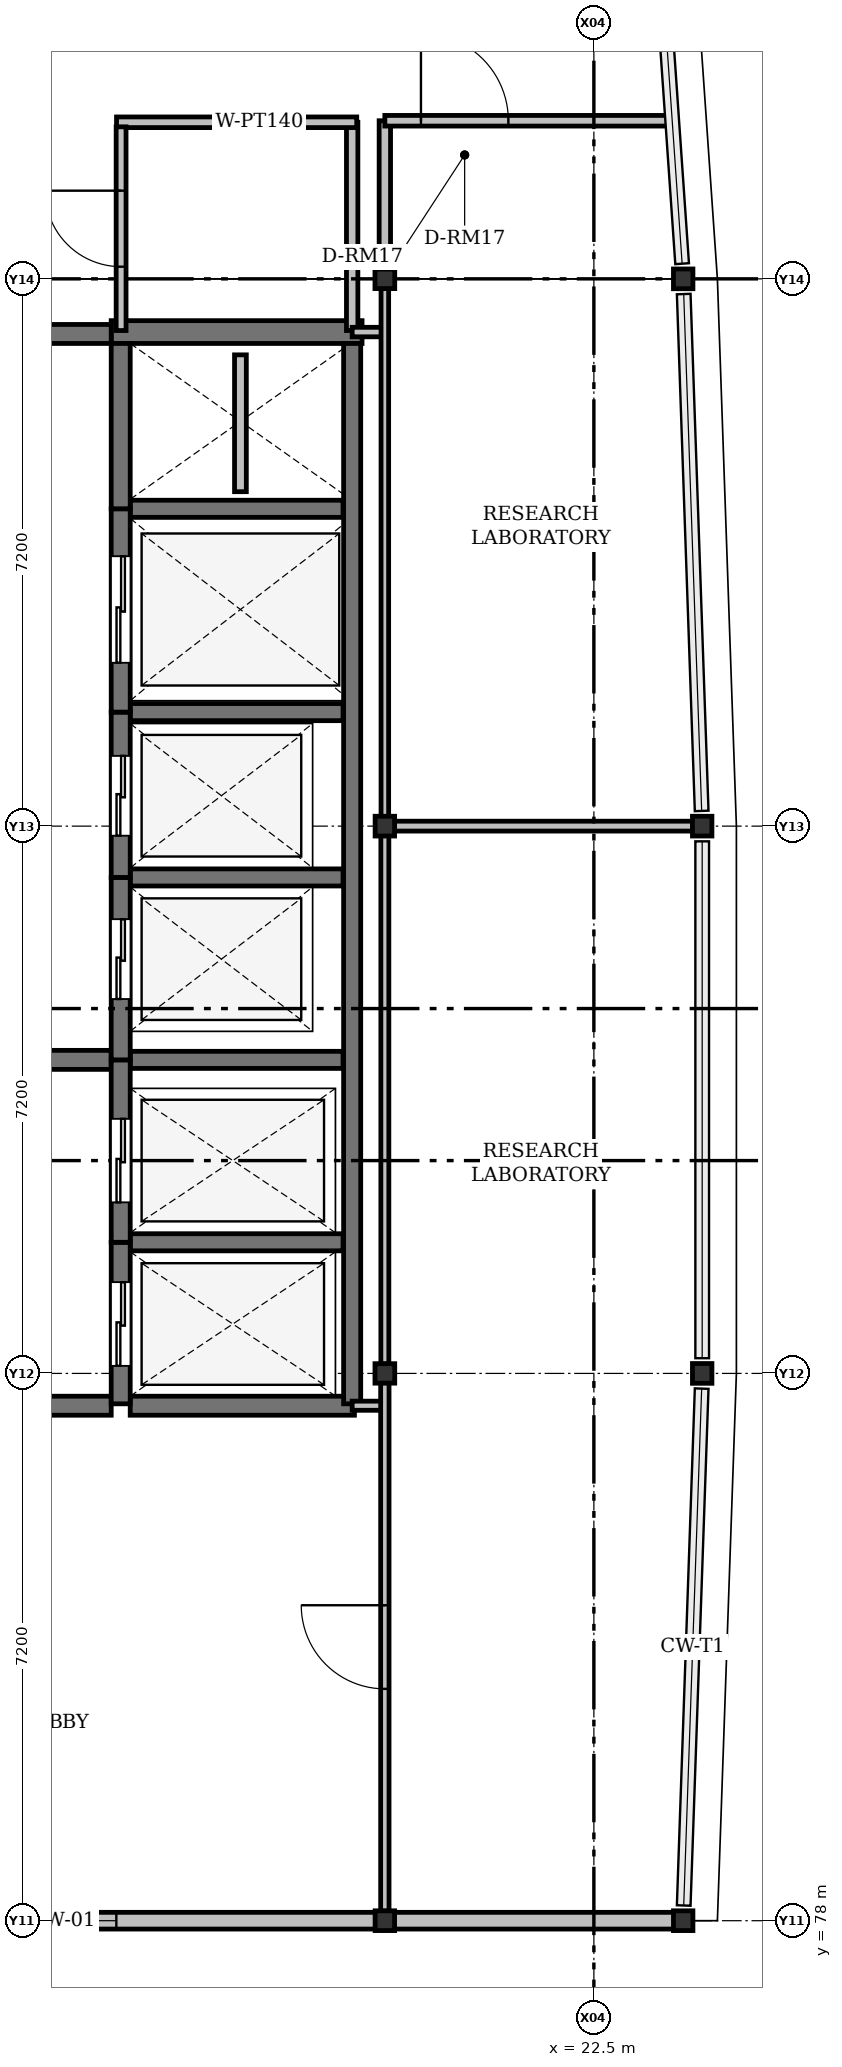
"""IFC4 building model, lengths in metres.
Left out: names, types, materials, properties, quantities, classifications, styles, units other than length and angle.
Written with IfcOpenShell. Run it as: python <this file> out.ifc"""

import sys

from ifc_helpers import new_model, si_unit, direction, frame, frame_2d, origin, origin_2d, place, context, subcontext, project, spatial, rectangle, i_section, extrude, element, fill, save


model = new_model("IFC4")
c1 = context("Model", 3, precision=1e-05, world=origin(), true_north=direction((0.0, 1.0)))
c2 = subcontext(c1, "Body", "Model", "MODEL_VIEW")
j1 = project(units=[si_unit("LENGTHUNIT", "METRE"), si_unit("PLANEANGLEUNIT", "RADIAN")], contexts=[c1])
p1 = place(None, origin())
s1 = spatial("IfcSite", under=j1, at=p1, CompositionType="ELEMENT")
p2 = place(p1, origin())
s2 = spatial("IfcBuilding", under=s1, at=p2, CompositionType="ELEMENT")
p3 = place(p2, frame((0.0, 0.0, 64.5)))
s3 = spatial("IfcBuildingStorey", under=s2, at=p3, CompositionType="ELEMENT", Elevation=64.5)
for number, where, z_axis, x_axis in (
    (1, (19.75, 78.0, 0.0), (0.0, 0.0, 1.0), (1.0, 0.0, 0.0)),
    (2, (23.675, 78.0, 0.0), (0.0, 0.0, 1.0), (1.0, 0.0, 0.0)),
    (3, (19.75, 85.2, 0.0), (0.0, 0.0, 1.0), (0.0, 1.0, 0.0)),
    (4, (23.925, 85.2, 0.0), (0.0, 0.0, 1.0), (1.0, 0.0, 0.0)),
    (5, (19.75, 92.4, 0.0), (0.0, 0.0, 1.0), (1.0, 0.0, 0.0)),
    (6, (23.925, 92.4, 0.0), (0.0, 0.0, 1.0), (1.0, 0.0, 0.0)),
    (7, (19.75, 99.6, 0.0), (0.0, 0.0, 1.0), (0.0, 1.0, 0.0)),
    (8, (23.675, 99.6, 0.0), (0.0, 0.0, 1.0), (1.0, 0.0, 0.0)),
):
    element("IfcColumn", number, at=place(p3, frame(where, z_axis=z_axis, x_axis=x_axis)), inside=s3, PredefinedType="COLUMN", context=c2, shape_type="SweptSolid", body=[
        extrude(i_section(OverallWidth=0.256, OverallDepth=0.26, WebThickness=0.011, FlangeThickness=0.017, FilletRadius=0.013, at=origin_2d()), origin(), (0.0, 0.0, 1.0), 4.2),
    ])
p4 = place(p3, frame((19.75, 78.0, 0.0), z_axis=(0.0, 0.0, 1.0), x_axis=(-1.0, 0.0, 0.0)))
e9 = element("IfcWall", 9, at=p4, inside=s3, PredefinedType="SOLIDWALL", context=c2, shape_type="SweptSolid", body=[
    extrude(rectangle(XDim=11.9, YDim=0.22, at=frame_2d((5.95, 0.0))), origin(), (0.0, 0.0, 1.0), 3.562),
])
p5 = place(p4, frame((3.532, 0.0, 0.92)))
e10 = element("IfcOpeningElement", 10, at=p5, cuts=e9, PredefinedType="OPENING", context=c2, shape_type="SweptSolid", body=[
    extrude(rectangle(XDim=1.2, YDim=1.4, at=frame_2d((0.6, 0.7))), frame((0.0, 0.11, 0.0), z_axis=(0.0, -1.0, 0.0), x_axis=(1.0, 0.0, 0.0)), (0.0, 0.0, 1.0), 0.22),
])
p6 = place(p4, frame((8.522, 0.0, 0.92)))
e11 = element("IfcOpeningElement", 11, at=p6, cuts=e9, PredefinedType="OPENING", context=c2, shape_type="SweptSolid", body=[
    extrude(rectangle(XDim=2.1, YDim=1.4, at=frame_2d((1.05, 0.7))), frame((0.0, 0.11, 0.0), z_axis=(0.0, -1.0, 0.0), x_axis=(1.0, 0.0, 0.0)), (0.0, 0.0, 1.0), 0.22),
])
p7 = place(p3, frame((23.675, 78.0, 0.0), z_axis=(0.0, 0.0, 1.0), x_axis=(-1.0, 0.0, 0.0)))
e12 = element("IfcWall", 12, at=p7, inside=s3, PredefinedType="SOLIDWALL", context=c2, shape_type="SweptSolid", body=[
    extrude(rectangle(XDim=3.925, YDim=0.22, at=frame_2d((1.962, 0.0))), origin(), (0.0, 0.0, 1.0), 3.562),
])
p8 = place(p3, frame((16.15, 98.9, 0.0), z_axis=(0.0, 0.0, 1.0), x_axis=(1.0, 0.0, 0.0)))
e13 = element("IfcWall", 13, at=p8, inside=s3, PredefinedType="SHEAR", context=c2, shape_type="SweptSolid", body=[
    extrude(rectangle(XDim=3.3, YDim=0.3, at=frame_2d((1.65, 0.0))), origin(), (0.0, 0.0, 1.0), 4.2),
])
p9 = place(p3, frame((12.12, 98.875, 0.0), z_axis=(0.0, 0.0, 1.0), x_axis=(1.0, 0.0, 0.0)))
e14 = element("IfcWall", 14, at=p9, inside=s3, PredefinedType="SHEAR", context=c2, shape_type="SweptSolid", body=[
    extrude(rectangle(XDim=4.03, YDim=0.25, at=frame_2d((2.015, 0.0))), origin(), (0.0, 0.0, 1.0), 4.2),
])
p10 = place(p9, frame((1.35, 0.0, 0.0)))
e15 = element("IfcOpeningElement", 15, at=p10, cuts=e14, PredefinedType="OPENING", context=c2, shape_type="SweptSolid", body=[
    extrude(rectangle(XDim=1.3, YDim=2.2, at=frame_2d((0.65, 1.1))), frame((0.0, 0.125, 0.0), z_axis=(0.0, -1.0, 0.0), x_axis=(1.0, 0.0, 0.0)), (0.0, 0.0, 1.0), 0.25),
])
p11 = place(p3, frame((12.12, 89.325, 0.0), z_axis=(0.0, 0.0, 1.0), x_axis=(1.0, 0.0, 0.0)))
e16 = element("IfcWall", 16, at=p11, inside=s3, PredefinedType="SHEAR", context=c2, shape_type="SweptSolid", body=[
    extrude(rectangle(XDim=4.03, YDim=0.25, at=frame_2d((2.015, 0.0))), origin(), (0.0, 0.0, 1.0), 4.2),
])
p12 = place(p11, frame((1.35, 0.0, 0.0)))
e17 = element("IfcOpeningElement", 17, at=p12, cuts=e16, PredefinedType="OPENING", context=c2, shape_type="SweptSolid", body=[
    extrude(rectangle(XDim=1.3, YDim=2.2, at=frame_2d((0.65, 1.1))), frame((0.0, 0.125, 0.0), z_axis=(0.0, -1.0, 0.0), x_axis=(1.0, 0.0, 0.0)), (0.0, 0.0, 1.0), 0.25),
])
p13 = place(p3, frame((12.12, 84.775, 0.0), z_axis=(0.0, 0.0, 1.0), x_axis=(1.0, 0.0, 0.0)))
e18 = element("IfcWall", 18, at=p13, inside=s3, PredefinedType="SHEAR", context=c2, shape_type="SweptSolid", body=[
    extrude(rectangle(XDim=4.03, YDim=0.25, at=frame_2d((2.015, 0.0))), origin(), (0.0, 0.0, 1.0), 4.2),
])
p14 = place(p13, frame((1.3, 0.0, 0.0)))
e19 = element("IfcOpeningElement", 19, at=p14, cuts=e18, PredefinedType="OPENING", context=c2, shape_type="SweptSolid", body=[
    extrude(rectangle(XDim=1.4, YDim=2.25, at=frame_2d((0.7, 1.125))), frame((0.0, 0.125, 0.0), z_axis=(0.0, -1.0, 0.0), x_axis=(1.0, 0.0, 0.0)), (0.0, 0.0, 1.0), 0.25),
])
p15 = place(p3, frame((16.4, 84.775, 0.0), z_axis=(0.0, 0.0, 1.0), x_axis=(1.0, 0.0, 0.0)))
e20 = element("IfcWall", 20, at=p15, inside=s3, PredefinedType="SHEAR", context=c2, shape_type="SweptSolid", body=[
    extrude(rectangle(XDim=2.95, YDim=0.25, at=frame_2d((1.475, 0.0))), origin(), (0.0, 0.0, 1.0), 4.2),
])
p16 = place(p3, frame((19.32, 84.8, 0.0), z_axis=(0.0, 0.0, 1.0), x_axis=(0.0, 1.0, 0.0)))
e21 = element("IfcWall", 21, at=p16, inside=s3, PredefinedType="SHEAR", context=c2, shape_type="SweptSolid", body=[
    extrude(rectangle(XDim=13.95, YDim=0.225, at=frame_2d((6.975, 0.0))), origin(), (0.0, 0.0, 1.0), 4.2),
])
for number, where, z_axis, x_axis in (
    (22, (16.4, 86.925, 0.0), (0.0, 0.0, 1.0), (1.0, 0.0, 0.0)),
    (23, (16.4, 89.325, 0.0), (0.0, 0.0, 1.0), (1.0, 0.0, 0.0)),
    (24, (16.4, 91.725, 0.0), (0.0, 0.0, 1.0), (1.0, 0.0, 0.0)),
    (25, (16.4, 93.9, 0.0), (0.0, 0.0, 1.0), (1.0, 0.0, 0.0)),
    (26, (16.4, 96.575, 0.0), (0.0, 0.0, 1.0), (1.0, 0.0, 0.0)),
):
    element("IfcWall", number, at=place(p3, frame(where, z_axis=z_axis, x_axis=x_axis)), inside=s3, PredefinedType="SHEAR", context=c2, shape_type="SweptSolid", body=[
        extrude(rectangle(XDim=2.8, YDim=0.225, at=frame_2d((1.4, 0.0))), origin(), (0.0, 0.0, 1.0), 4.2),
    ])
p17 = place(p3, frame((16.275, 84.8, 0.0), z_axis=(0.0, 0.0, 1.0), x_axis=(0.0, 1.0, 0.0)))
e27 = element("IfcWall", 27, at=p17, inside=s3, PredefinedType="SHEAR", context=c2, shape_type="SweptSolid", body=[
    extrude(rectangle(XDim=2.125, YDim=0.25, at=frame_2d((1.062, 0.0))), origin(), (0.0, 0.0, 1.0), 4.2),
])
p18 = place(p17, frame((0.5, 0.0, 0.0)))
e28 = element("IfcOpeningElement", 28, at=p18, cuts=e27, PredefinedType="OPENING", context=c2, shape_type="SweptSolid", body=[
    extrude(rectangle(XDim=1.1, YDim=2.15, at=frame_2d((0.55, 1.075))), frame((0.0, 0.125, 0.0), z_axis=(0.0, -1.0, 0.0), x_axis=(1.0, 0.0, 0.0)), (0.0, 0.0, 1.0), 0.25),
])
p19 = place(p3, frame((16.275, 86.925, 0.0), z_axis=(0.0, 0.0, 1.0), x_axis=(0.0, 1.0, 0.0)))
e29 = element("IfcWall", 29, at=p19, inside=s3, PredefinedType="SHEAR", context=c2, shape_type="SweptSolid", body=[
    extrude(rectangle(XDim=2.4, YDim=0.25, at=frame_2d((1.2, 0.0))), origin(), (0.0, 0.0, 1.0), 4.2),
])
p20 = place(p19, frame((0.525, 0.0, 0.0)))
e30 = element("IfcOpeningElement", 30, at=p20, cuts=e29, PredefinedType="OPENING", context=c2, shape_type="SweptSolid", body=[
    extrude(rectangle(XDim=1.1, YDim=2.15, at=frame_2d((0.55, 1.075))), frame((0.0, 0.125, 0.0), z_axis=(0.0, -1.0, 0.0), x_axis=(1.0, 0.0, 0.0)), (0.0, 0.0, 1.0), 0.25),
])
p21 = place(p3, frame((16.275, 89.325, 0.0), z_axis=(0.0, 0.0, 1.0), x_axis=(0.0, 1.0, 0.0)))
e31 = element("IfcWall", 31, at=p21, inside=s3, PredefinedType="SHEAR", context=c2, shape_type="SweptSolid", body=[
    extrude(rectangle(XDim=2.4, YDim=0.25, at=frame_2d((1.2, 0.0))), origin(), (0.0, 0.0, 1.0), 4.2),
])
p22 = place(p21, frame((0.8, 0.0, 0.0)))
e32 = element("IfcOpeningElement", 32, at=p22, cuts=e31, PredefinedType="OPENING", context=c2, shape_type="SweptSolid", body=[
    extrude(rectangle(XDim=1.05, YDim=2.15, at=frame_2d((0.525, 1.075))), frame((0.0, 0.125, 0.0), z_axis=(0.0, -1.0, 0.0), x_axis=(1.0, 0.0, 0.0)), (0.0, 0.0, 1.0), 0.25),
])
p23 = place(p3, frame((16.275, 91.725, 0.0), z_axis=(0.0, 0.0, 1.0), x_axis=(0.0, 1.0, 0.0)))
e33 = element("IfcWall", 33, at=p23, inside=s3, PredefinedType="SHEAR", context=c2, shape_type="SweptSolid", body=[
    extrude(rectangle(XDim=2.175, YDim=0.25, at=frame_2d((1.087, 0.0))), origin(), (0.0, 0.0, 1.0), 4.2),
])
p24 = place(p23, frame((0.55, 0.0, 0.0)))
e34 = element("IfcOpeningElement", 34, at=p24, cuts=e33, PredefinedType="OPENING", context=c2, shape_type="SweptSolid", body=[
    extrude(rectangle(XDim=1.05, YDim=2.15, at=frame_2d((0.525, 1.075))), frame((0.0, 0.125, 0.0), z_axis=(0.0, -1.0, 0.0), x_axis=(1.0, 0.0, 0.0)), (0.0, 0.0, 1.0), 0.25),
])
p25 = place(p3, frame((16.275, 93.9, 0.0), z_axis=(0.0, 0.0, 1.0), x_axis=(0.0, 1.0, 0.0)))
e35 = element("IfcWall", 35, at=p25, inside=s3, PredefinedType="SHEAR", context=c2, shape_type="SweptSolid", body=[
    extrude(rectangle(XDim=2.675, YDim=0.25, at=frame_2d((1.337, 0.0))), origin(), (0.0, 0.0, 1.0), 4.2),
])
p26 = place(p25, frame((0.65, 0.0, 0.0)))
e36 = element("IfcOpeningElement", 36, at=p26, cuts=e35, PredefinedType="OPENING", context=c2, shape_type="SweptSolid", body=[
    extrude(rectangle(XDim=1.4, YDim=2.25, at=frame_2d((0.7, 1.125))), frame((0.0, 0.125, 0.0), z_axis=(0.0, -1.0, 0.0), x_axis=(1.0, 0.0, 0.0)), (0.0, 0.0, 1.0), 0.25),
])
p27 = place(p3, frame((16.275, 96.575, 0.0), z_axis=(0.0, 0.0, 1.0), x_axis=(0.0, 1.0, 0.0)))
e37 = element("IfcWall", 37, at=p27, inside=s3, PredefinedType="SHEAR", context=c2, shape_type="SweptSolid", body=[
    extrude(rectangle(XDim=2.175, YDim=0.25, at=frame_2d((1.087, 0.0))), origin(), (0.0, 0.0, 1.0), 4.2),
])
p28 = place(p3, frame((17.85, 96.8, 0.0), z_axis=(0.0, 0.0, 1.0), x_axis=(0.0, 1.0, 0.0)))
e38 = element("IfcWall", 38, at=p28, inside=s3, PredefinedType="PLUMBINGWALL", context=c2, shape_type="SweptSolid", body=[
    extrude(rectangle(XDim=1.8, YDim=0.155, at=frame_2d((0.9, 0.0))), origin(), (0.0, 0.0, 1.0), 4.2),
])
p29 = place(p3, frame((19.32, 98.92, 0.0), z_axis=(0.0, 0.0, 1.0), x_axis=(0.0, 1.0, 0.0)))
e39 = element("IfcWall", 39, at=p29, inside=s3, PredefinedType="PARTITIONING", context=c2, shape_type="SweptSolid", body=[
    extrude(rectangle(XDim=2.74, YDim=0.15, at=frame_2d((1.37, 0.0))), origin(), (0.0, 0.0, 1.0), 3.436),
])
p30 = place(p3, frame((19.38, 101.66, 0.0), z_axis=(0.0, 0.0, 1.0), x_axis=(-1.0, 0.0, 0.0)))
e40 = element("IfcWall", 40, at=p30, inside=s3, PredefinedType="PARTITIONING", context=c2, shape_type="SweptSolid", body=[
    extrude(rectangle(XDim=3.16, YDim=0.14, at=frame_2d((1.58, 0.0))), origin(), (0.0, 0.0, 1.0), 3.95),
])
p31 = place(p3, frame((16.28, 98.92, 0.0), z_axis=(0.0, 0.0, 1.0), x_axis=(0.0, 1.0, 0.0)))
e41 = element("IfcWall", 41, at=p31, inside=s3, PredefinedType="PARTITIONING", context=c2, shape_type="SweptSolid", body=[
    extrude(rectangle(XDim=2.68, YDim=0.13, at=frame_2d((1.34, 0.0))), origin(), (0.0, 0.0, 1.0), 3.436),
])
p32 = place(p31, frame((0.84, 0.0, 0.0)))
e42 = element("IfcOpeningElement", 42, at=p32, cuts=e41, PredefinedType="OPENING", context=c2, shape_type="SweptSolid", body=[
    extrude(rectangle(XDim=1.0, YDim=2.1, at=frame_2d((0.5, 1.05))), frame((0.0, 0.065, 0.0), z_axis=(0.0, -1.0, 0.0), x_axis=(1.0, 0.0, 0.0)), (0.0, 0.0, 1.0), 0.13),
])
p33 = place(p3, frame((19.75, 98.9, 0.0), z_axis=(0.0, 0.0, 1.0), x_axis=(-1.0, 0.0, 0.0)))
e43 = element("IfcWall", 43, at=p33, inside=s3, PredefinedType="PARTITIONING", context=c2, shape_type="SweptSolid", body=[
    extrude(rectangle(XDim=0.43, YDim=0.125, at=frame_2d((0.215, 0.0))), origin(), (0.0, 0.0, 1.0), 3.512),
])
p34 = place(p3, frame((19.32, 84.775, 0.0), z_axis=(0.0, 0.0, 1.0), x_axis=(1.0, 0.0, 0.0)))
e44 = element("IfcWall", 44, at=p34, inside=s3, PredefinedType="PARTITIONING", context=c2, shape_type="SweptSolid", body=[
    extrude(rectangle(XDim=0.43, YDim=0.12, at=frame_2d((0.215, 0.0))), origin(), (0.0, 0.0, 1.0), 3.512),
])
p35 = place(p3, frame((19.75, 78.125, 0.0), z_axis=(0.0, 0.0, 1.0), x_axis=(0.0, 1.0, 0.0)))
e45 = element("IfcWall", 45, at=p35, inside=s3, PredefinedType="PARTITIONING", context=c2, shape_type="SweptSolid", body=[
    extrude(rectangle(XDim=6.952, YDim=0.11, at=frame_2d((3.476, 0.0))), origin(), (0.0, 0.0, 1.0), 3.512),
])
p36 = place(p35, frame((2.925, 0.0, 0.0)))
e46 = element("IfcOpeningElement", 46, at=p36, cuts=e45, PredefinedType="OPENING", context=c2, shape_type="SweptSolid", body=[
    extrude(rectangle(XDim=1.1, YDim=2.2, at=frame_2d((0.55, 1.1))), frame((0.0, 0.055, 0.0), z_axis=(0.0, -1.0, 0.0), x_axis=(1.0, 0.0, 0.0)), (0.0, 0.0, 1.0), 0.11),
])
p37 = place(p3, frame((19.75, 85.323, 0.0), z_axis=(0.0, 0.0, 1.0), x_axis=(0.0, 1.0, 0.0)))
e47 = element("IfcWall", 47, at=p37, inside=s3, PredefinedType="PARTITIONING", context=c2, shape_type="SweptSolid", body=[
    extrude(rectangle(XDim=6.952, YDim=0.105, at=frame_2d((3.476, 0.0))), origin(), (0.0, 0.0, 1.0), 3.512),
])
p38 = place(p3, frame((19.75, 92.525, 0.0), z_axis=(0.0, 0.0, 1.0), x_axis=(0.0, 1.0, 0.0)))
e48 = element("IfcWall", 48, at=p38, inside=s3, PredefinedType="PARTITIONING", context=c2, shape_type="SweptSolid", body=[
    extrude(rectangle(XDim=6.952, YDim=0.1, at=frame_2d((3.476, 0.0))), origin(), (0.0, 0.0, 1.0), 3.512),
])
p39 = place(p3, frame((19.75, 99.723, 0.0), z_axis=(0.0, 0.0, 1.0), x_axis=(0.0, 1.0, 0.0)))
e49 = element("IfcWall", 49, at=p39, inside=s3, PredefinedType="PARTITIONING", context=c2, shape_type="SweptSolid", body=[
    extrude(rectangle(XDim=1.957, YDim=0.15, at=frame_2d((0.979, 0.0))), origin(), (0.0, 0.0, 1.0), 3.512),
])
p40 = place(p3, frame((19.75, 101.68, 0.0), z_axis=(0.0, 0.0, 1.0), x_axis=(1.0, 0.0, 0.0)))
e50 = element("IfcWall", 50, at=p40, inside=s3, PredefinedType="PARTITIONING", context=c2, shape_type="SweptSolid", body=[
    extrude(rectangle(XDim=3.79, YDim=0.14, at=frame_2d((1.895, 0.0))), origin(), (0.0, 0.0, 1.0), 3.512),
])
p41 = place(p40, frame((0.475, 0.0, 0.0)))
e51 = element("IfcOpeningElement", 51, at=p41, cuts=e50, PredefinedType="OPENING", context=c2, shape_type="SweptSolid", body=[
    extrude(rectangle(XDim=1.15, YDim=2.2, at=frame_2d((0.575, 1.1))), frame((0.0, 0.07, 0.0), z_axis=(0.0, -1.0, 0.0), x_axis=(1.0, 0.0, 0.0)), (0.0, 0.0, 1.0), 0.14),
])
p42 = place(p3, frame((23.802, 92.4, 0.0), z_axis=(0.0, 0.0, 1.0), x_axis=(-1.0, 0.0, 0.0)))
e52 = element("IfcWall", 52, at=p42, inside=s3, PredefinedType="PARTITIONING", context=c2, shape_type="SweptSolid", body=[
    extrude(rectangle(XDim=3.929, YDim=0.13, at=frame_2d((1.964, 0.0))), origin(), (0.0, 0.0, 1.0), 3.436),
])
p43 = place(p5, origin())
e53 = element("IfcWindow", 53, at=p43, inside=s3, PartitioningType="SINGLE_PANEL", PredefinedType="WINDOW", context=c2, shape_type="SweptSolid", body=[
    extrude(rectangle(XDim=1.2, YDim=1.4, at=frame_2d((0.6, 0.7))), frame((0.0, 0.03, 0.0), z_axis=(0.0, -1.0, 0.0), x_axis=(1.0, 0.0, 0.0)), (0.0, 0.0, 1.0), 0.06),
])
fill(e10, e53)
p44 = place(p18, origin())
e54 = element("IfcDoor", 54, at=p44, inside=s3, OperationType="SLIDING_TO_LEFT", PredefinedType="DOOR", context=c2, shape_type="SweptSolid", body=[
    extrude(rectangle(XDim=1.1, YDim=2.15, at=frame_2d((0.55, 1.075))), frame((0.0, 0.025, 0.0), z_axis=(0.0, -1.0, 0.0), x_axis=(1.0, 0.0, 0.0)), (0.0, 0.0, 1.0), 0.05),
])
fill(e28, e54)
p45 = place(p20, origin())
e55 = element("IfcDoor", 55, at=p45, inside=s3, OperationType="SLIDING_TO_LEFT", PredefinedType="DOOR", context=c2, shape_type="SweptSolid", body=[
    extrude(rectangle(XDim=1.1, YDim=2.15, at=frame_2d((0.55, 1.075))), frame((0.0, 0.025, 0.0), z_axis=(0.0, -1.0, 0.0), x_axis=(1.0, 0.0, 0.0)), (0.0, 0.0, 1.0), 0.05),
])
fill(e30, e55)
p46 = place(p22, origin())
e56 = element("IfcDoor", 56, at=p46, inside=s3, OperationType="SLIDING_TO_LEFT", PredefinedType="DOOR", context=c2, shape_type="SweptSolid", body=[
    extrude(rectangle(XDim=1.05, YDim=2.15, at=frame_2d((0.525, 1.075))), frame((0.0, 0.025, 0.0), z_axis=(0.0, -1.0, 0.0), x_axis=(1.0, 0.0, 0.0)), (0.0, 0.0, 1.0), 0.05),
])
fill(e32, e56)
p47 = place(p24, origin())
e57 = element("IfcDoor", 57, at=p47, inside=s3, OperationType="SLIDING_TO_LEFT", PredefinedType="DOOR", context=c2, shape_type="SweptSolid", body=[
    extrude(rectangle(XDim=1.05, YDim=2.15, at=frame_2d((0.525, 1.075))), frame((0.0, 0.025, 0.0), z_axis=(0.0, -1.0, 0.0), x_axis=(1.0, 0.0, 0.0)), (0.0, 0.0, 1.0), 0.05),
])
fill(e34, e57)
p48 = place(p26, origin())
e58 = element("IfcDoor", 58, at=p48, inside=s3, OperationType="SLIDING_TO_LEFT", PredefinedType="DOOR", context=c2, shape_type="SweptSolid", body=[
    extrude(rectangle(XDim=1.4, YDim=2.25, at=frame_2d((0.7, 1.125))), frame((0.0, 0.025, 0.0), z_axis=(0.0, -1.0, 0.0), x_axis=(1.0, 0.0, 0.0)), (0.0, 0.0, 1.0), 0.05),
])
fill(e36, e58)
p49 = place(p32, origin())
e59 = element("IfcDoor", 59, at=p49, inside=s3, OperationType="SINGLE_SWING_RIGHT", PredefinedType="DOOR", context=c2, shape_type="SweptSolid", body=[
    extrude(rectangle(XDim=1.0, YDim=2.1, at=frame_2d((0.5, 1.05))), frame((0.0, 0.025, 0.0), z_axis=(0.0, -1.0, 0.0), x_axis=(1.0, 0.0, 0.0)), (0.0, 0.0, 1.0), 0.05),
])
fill(e42, e59)
p50 = place(p36, origin())
e60 = element("IfcDoor", 60, at=p50, inside=s3, OperationType="SINGLE_SWING_RIGHT", PredefinedType="DOOR", context=c2, shape_type="SweptSolid", body=[
    extrude(rectangle(XDim=1.1, YDim=2.2, at=frame_2d((0.55, 1.1))), frame((0.0, 0.025, 0.0), z_axis=(0.0, -1.0, 0.0), x_axis=(1.0, 0.0, 0.0)), (0.0, 0.0, 1.0), 0.05),
])
fill(e46, e60)
p51 = place(p41, origin())
e61 = element("IfcDoor", 61, at=p51, inside=s3, OperationType="SINGLE_SWING_LEFT", PredefinedType="DOOR", context=c2, shape_type="SweptSolid", body=[
    extrude(rectangle(XDim=1.15, YDim=2.2, at=frame_2d((0.575, 1.1))), frame((0.0, 0.025, 0.0), z_axis=(0.0, -1.0, 0.0), x_axis=(1.0, 0.0, 0.0)), (0.0, 0.0, 1.0), 0.05),
])
fill(e51, e61)
save(model, sys.argv[1])
